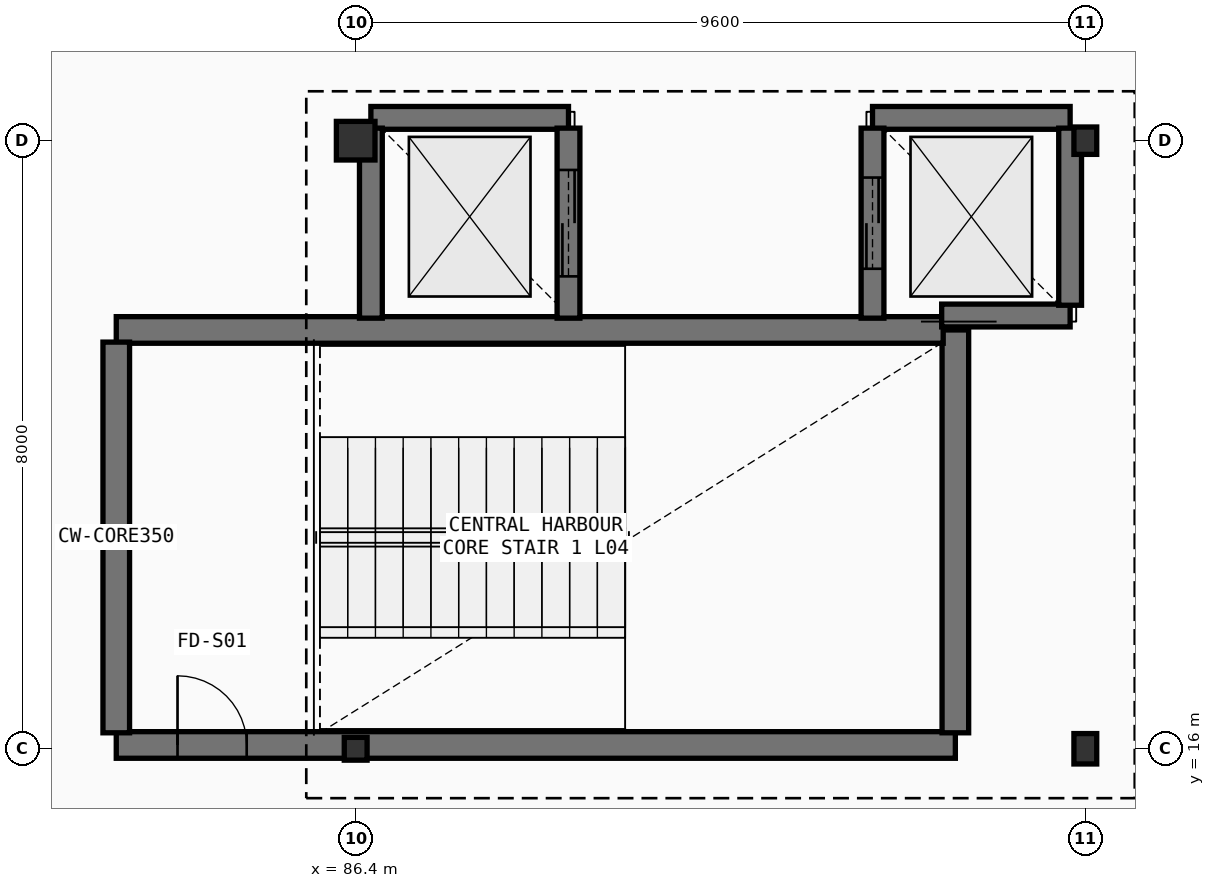
"""IFC4 building model, lengths in metres.
Left out: names, types, materials, properties, quantities, classifications, styles, units other than length and angle.
Written with IfcOpenShell. Run it as: python <this file> out.ifc"""

import sys

from ifc_helpers import new_model, si_unit, direction, frame, frame_2d, origin, origin_2d, place, context, subcontext, project, spatial, rectangle, hollow_circle, i_section, extrude, element, fill, save


model = new_model("IFC4")
c1 = context("Model", 3, precision=1e-05, world=origin(), true_north=direction((0.0, 1.0)))
c2 = subcontext(c1, "Body", "Model", "MODEL_VIEW")
j1 = project(units=[si_unit("LENGTHUNIT", "METRE"), si_unit("PLANEANGLEUNIT", "RADIAN")], contexts=[c1])
p1 = place(None, origin())
s1 = spatial("IfcSite", under=j1, at=p1, CompositionType="ELEMENT")
p2 = place(p1, origin())
s2 = spatial("IfcBuilding", under=s1, at=p2, CompositionType="ELEMENT")
p3 = place(p2, frame((0.0, 0.0, 20.4)))
s3 = spatial("IfcBuildingStorey", under=s2, at=p3, CompositionType="ELEMENT", Elevation=20.4)
p4 = place(p3, frame((86.4, 16.0, 0.0), z_axis=(0.0, 0.0, 1.0), x_axis=(1.0, 0.0, 0.0)))
e1 = element("IfcColumn", 1, at=p4, inside=s3, PredefinedType="COLUMN", context=c2, shape_type="SweptSolid", body=[
    extrude(i_section(OverallWidth=0.3, OverallDepth=0.3, WebThickness=0.011, FlangeThickness=0.019, FilletRadius=0.027, at=origin_2d()), origin(), (0.0, 0.0, 1.0), 4.5),
])
p5 = place(p3, frame((86.4, 24.0, 0.0), z_axis=(0.0, 0.0, 1.0), x_axis=(1.0, 0.0, 0.0)))
e2 = element("IfcColumn", 2, at=p5, inside=s3, PredefinedType="COLUMN", context=c2, shape_type="SweptSolid", body=[
    extrude(hollow_circle(Radius=0.254, WallThickness=0.025, at=origin_2d()), origin(), (0.0, 0.0, 1.0), 4.5),
])
p6 = place(p3, frame((96.0, 16.0, 0.0), z_axis=(0.0, 0.0, 1.0), x_axis=(1.0, 0.0, 0.0)))
e3 = element("IfcColumn", 3, at=p6, inside=s3, PredefinedType="COLUMN", context=c2, shape_type="SweptSolid", body=[
    extrude(i_section(OverallWidth=0.3, OverallDepth=0.4, WebThickness=0.013, FlangeThickness=0.024, FilletRadius=0.027, at=origin_2d()), origin(), (0.0, 0.0, 1.0), 4.5),
])
p7 = place(p3, frame((96.0, 24.0, 0.0), z_axis=(0.0, 0.0, 1.0), x_axis=(1.0, 0.0, 0.0)))
e4 = element("IfcColumn", 4, at=p7, inside=s3, PredefinedType="COLUMN", context=c2, shape_type="SweptSolid", body=[
    extrude(i_section(OverallWidth=0.3, OverallDepth=0.36, WebThickness=0.012, FlangeThickness=0.022, FilletRadius=0.027, at=origin_2d()), origin(), (0.0, 0.0, 1.0), 4.5),
])
p8 = place(p3, frame((83.25, 16.05, 0.0), z_axis=(0.0, 0.0, 1.0), x_axis=(1.0, 0.0, 0.0)))
e5 = element("IfcWall", 5, at=p8, inside=s3, PredefinedType="SHEAR", context=c2, shape_type="SweptSolid", body=[
    extrude(rectangle(XDim=11.04, YDim=0.35, at=frame_2d((5.52, 0.0))), origin(), (0.0, 0.0, 1.0), 4.25),
])
p9 = place(p8, frame((0.806, 0.0, 0.0)))
e6 = element("IfcOpeningElement", 6, at=p9, cuts=e5, PredefinedType="OPENING", context=c2, shape_type="SweptSolid", body=[
    extrude(rectangle(XDim=0.91, YDim=2.08, at=frame_2d((0.455, 1.04))), frame((0.0, 0.185, 0.0), z_axis=(0.0, -1.0, 0.0), x_axis=(1.0, 0.0, 0.0)), (0.0, 0.0, 1.0), 0.37),
])
p10 = place(p3, frame((94.29, 16.21, 0.0), z_axis=(0.0, 0.0, 1.0), x_axis=(0.0, 1.0, 0.0)))
e7 = element("IfcWall", 7, at=p10, inside=s3, PredefinedType="SHEAR", context=c2, shape_type="SweptSolid", body=[
    extrude(rectangle(XDim=5.3, YDim=0.35, at=frame_2d((2.65, 0.0))), origin(), (0.0, 0.0, 1.0), 4.25),
])
p11 = place(p3, frame((94.13, 21.51, 0.0), z_axis=(0.0, 0.0, 1.0), x_axis=(-1.0, 0.0, 0.0)))
e8 = element("IfcWall", 8, at=p11, inside=s3, PredefinedType="SHEAR", context=c2, shape_type="SweptSolid", body=[
    extrude(rectangle(XDim=10.88, YDim=0.35, at=frame_2d((5.44, 0.0))), origin(), (0.0, 0.0, 1.0), 4.25),
])
p12 = place(p3, frame((83.25, 21.35, 0.0), z_axis=(0.0, 0.0, 1.0), x_axis=(0.0, -1.0, 0.0)))
e9 = element("IfcWall", 9, at=p12, inside=s3, PredefinedType="SHEAR", context=c2, shape_type="SweptSolid", body=[
    extrude(rectangle(XDim=5.14, YDim=0.35, at=frame_2d((2.57, 0.0))), origin(), (0.0, 0.0, 1.0), 4.25),
])
p13 = place(p3, frame((89.2, 24.3, 0.0), z_axis=(0.0, 0.0, 1.0), x_axis=(-1.0, 0.0, 0.0)))
e10 = element("IfcWall", 10, at=p13, inside=s3, PredefinedType="SHEAR", context=c2, shape_type="SweptSolid", body=[
    extrude(rectangle(XDim=2.6, YDim=0.3, at=frame_2d((1.3, 0.0))), origin(), (0.0, 0.0, 1.0), 4.25),
])
p14 = place(p3, frame((89.2, 21.665, 0.0), z_axis=(0.0, 0.0, 1.0), x_axis=(0.0, 1.0, 0.0)))
e11 = element("IfcWall", 11, at=p14, inside=s3, PredefinedType="SHEAR", context=c2, shape_type="SweptSolid", body=[
    extrude(rectangle(XDim=2.5, YDim=0.3, at=frame_2d((1.25, 0.0))), origin(), (0.0, 0.0, 1.0), 4.25),
])
p15 = place(p14, frame((0.55, 0.0, 0.0)))
e12 = element("IfcOpeningElement", 12, at=p15, cuts=e11, PredefinedType="OPENING", context=c2, shape_type="SweptSolid", body=[
    extrude(rectangle(XDim=1.4, YDim=2.26, at=frame_2d((0.7, 1.13))), frame((0.0, 0.16, 0.0), z_axis=(0.0, -1.0, 0.0), x_axis=(1.0, 0.0, 0.0)), (0.0, 0.0, 1.0), 0.32),
])
p16 = place(p3, frame((86.6, 24.165, 0.0), z_axis=(0.0, 0.0, 1.0), x_axis=(0.0, -1.0, 0.0)))
e13 = element("IfcWall", 13, at=p16, inside=s3, PredefinedType="SHEAR", context=c2, shape_type="SweptSolid", body=[
    extrude(rectangle(XDim=2.5, YDim=0.3, at=frame_2d((1.25, 0.0))), origin(), (0.0, 0.0, 1.0), 4.25),
])
p17 = place(p3, frame((95.8, 24.3, 0.0), z_axis=(0.0, 0.0, 1.0), x_axis=(-1.0, 0.0, 0.0)))
e14 = element("IfcWall", 14, at=p17, inside=s3, PredefinedType="SHEAR", context=c2, shape_type="SweptSolid", body=[
    extrude(rectangle(XDim=2.6, YDim=0.3, at=frame_2d((1.3, 0.0))), origin(), (0.0, 0.0, 1.0), 4.25),
])
p18 = place(p3, frame((94.11, 21.7, 0.0), z_axis=(0.0, 0.0, 1.0), x_axis=(1.0, 0.0, 0.0)))
e15 = element("IfcWall", 15, at=p18, inside=s3, PredefinedType="SHEAR", context=c2, shape_type="SweptSolid", body=[
    extrude(rectangle(XDim=1.69, YDim=0.3, at=frame_2d((0.845, 0.0))), origin(), (0.0, 0.0, 1.0), 4.25),
])
p19 = place(p3, frame((95.8, 21.835, 0.0), z_axis=(0.0, 0.0, 1.0), x_axis=(0.0, 1.0, 0.0)))
e16 = element("IfcWall", 16, at=p19, inside=s3, PredefinedType="SHEAR", context=c2, shape_type="SweptSolid", body=[
    extrude(rectangle(XDim=2.33, YDim=0.3, at=frame_2d((1.165, 0.0))), origin(), (0.0, 0.0, 1.0), 4.25),
])
p20 = place(p3, frame((93.2, 24.165, 0.0), z_axis=(0.0, 0.0, 1.0), x_axis=(0.0, -1.0, 0.0)))
e17 = element("IfcWall", 17, at=p20, inside=s3, PredefinedType="SHEAR", context=c2, shape_type="SweptSolid", body=[
    extrude(rectangle(XDim=2.5, YDim=0.3, at=frame_2d((1.25, 0.0))), origin(), (0.0, 0.0, 1.0), 4.25),
])
p21 = place(p20, frame((0.65, 0.0, 0.0)))
e18 = element("IfcOpeningElement", 18, at=p21, cuts=e17, PredefinedType="OPENING", context=c2, shape_type="SweptSolid", body=[
    extrude(rectangle(XDim=1.2, YDim=2.2, at=frame_2d((0.6, 1.1))), frame((0.0, 0.16, 0.0), z_axis=(0.0, -1.0, 0.0), x_axis=(1.0, 0.0, 0.0)), (0.0, 0.0, 1.0), 0.32),
])
p22 = place(p9, origin())
e19 = element("IfcDoor", 19, at=p22, inside=s3, OperationType="SINGLE_SWING_RIGHT", PredefinedType="DOOR", context=c2, shape_type="SweptSolid", body=[
    extrude(rectangle(XDim=0.91, YDim=2.08, at=frame_2d((0.455, 1.04))), frame((0.0, 0.025, 0.0), z_axis=(0.0, -1.0, 0.0), x_axis=(1.0, 0.0, 0.0)), (0.0, 0.0, 1.0), 0.05),
])
fill(e6, e19)
p23 = place(p15, origin())
e20 = element("IfcDoor", 20, at=p23, inside=s3, OperationType="DOUBLE_DOOR_SLIDING", PredefinedType="DOOR", context=c2, shape_type="SweptSolid", body=[
    extrude(rectangle(XDim=1.4, YDim=2.26, at=frame_2d((0.7, 1.13))), frame((0.0, 0.025, 0.0), z_axis=(0.0, -1.0, 0.0), x_axis=(1.0, 0.0, 0.0)), (0.0, 0.0, 1.0), 0.05),
])
fill(e12, e20)
p24 = place(p21, origin())
e21 = element("IfcDoor", 21, at=p24, inside=s3, OperationType="DOUBLE_DOOR_SLIDING", PredefinedType="DOOR", context=c2, shape_type="SweptSolid", body=[
    extrude(rectangle(XDim=1.2, YDim=2.2, at=frame_2d((0.6, 1.1))), frame((0.0, 0.025, 0.0), z_axis=(0.0, -1.0, 0.0), x_axis=(1.0, 0.0, 0.0)), (0.0, 0.0, 1.0), 0.05),
])
fill(e18, e21)
save(model, sys.argv[1])
